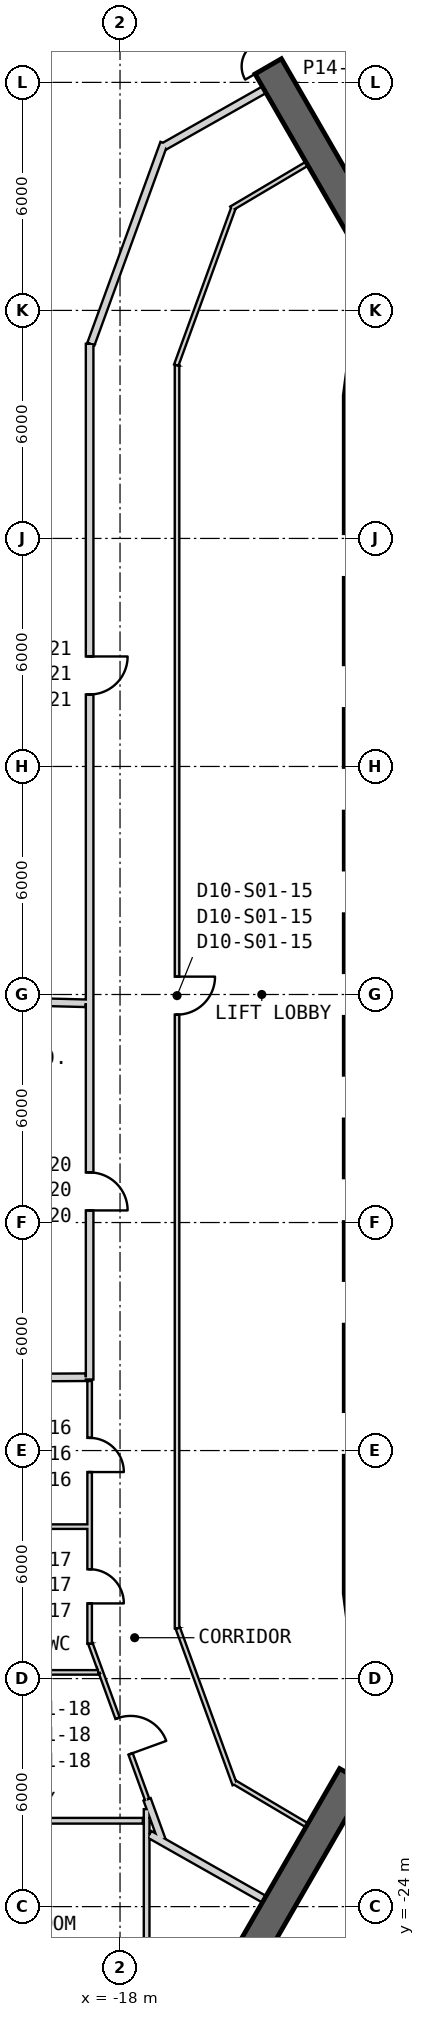
"""IFC4 building model, lengths in metres.
Left out: names, types, materials, properties, quantities, classifications, styles, units other than length and angle.
Written with IfcOpenShell. Run it as: python <this file> out.ifc"""

import sys

from ifc_helpers import new_model, si_unit, direction, frame, frame_2d, origin, place, context, subcontext, project, spatial, polyline, rectangle, outline, extrude, element, fill, save


model = new_model("IFC4")
c1 = context("Model", 3, precision=1e-05, world=origin(), true_north=direction((0.0, 1.0)))
c2 = subcontext(c1, "Body", "Model", "MODEL_VIEW")
j1 = project(units=[si_unit("LENGTHUNIT", "METRE"), si_unit("PLANEANGLEUNIT", "RADIAN")], contexts=[c1])
p1 = place(None, origin())
s1 = spatial("IfcSite", under=j1, at=p1, CompositionType="ELEMENT")
p2 = place(p1, origin())
s2 = spatial("IfcBuilding", under=s1, at=p2, CompositionType="ELEMENT")
p3 = place(p2, frame((0.0, 0.0, 57.8)))
s3 = spatial("IfcBuildingStorey", under=s2, at=p3, CompositionType="ELEMENT", Elevation=57.8)
p4 = place(p3, frame((-11.65, 15.762, 0.0), z_axis=(0.0, 0.0, 1.0), x_axis=(0.0, -1.0, 0.0)))
e1 = element("IfcWall", 1, at=p4, inside=s3, PredefinedType="SHEAR", context=c2, shape_type="SweptSolid", body=[
    extrude(rectangle(XDim=31.523, YDim=0.9, at=frame_2d((15.762, 0.0))), origin(), (0.0, 0.0, 1.0), 4.1),
])
p5 = place(p4, frame((7.062, 0.0, 0.0)))
e2 = element("IfcOpeningElement", 2, at=p5, cuts=e1, PredefinedType="OPENING", context=c2, shape_type="SweptSolid", body=[
    extrude(rectangle(XDim=1.2, YDim=2.4, at=frame_2d((0.6, 1.2))), frame((0.0, 0.46, 0.0), z_axis=(0.0, -1.0, 0.0), x_axis=(1.0, 0.0, 0.0)), (0.0, 0.0, 1.0), 0.92),
])
p6 = place(p4, frame((9.762, 0.0, 0.0)))
e3 = element("IfcOpeningElement", 3, at=p6, cuts=e1, PredefinedType="OPENING", context=c2, shape_type="SweptSolid", body=[
    extrude(rectangle(XDim=1.2, YDim=2.4, at=frame_2d((0.6, 1.2))), frame((0.0, 0.46, 0.0), z_axis=(0.0, -1.0, 0.0), x_axis=(1.0, 0.0, 0.0)), (0.0, 0.0, 1.0), 0.92),
])
p7 = place(p4, frame((12.462, 0.0, 0.0)))
e4 = element("IfcOpeningElement", 4, at=p7, cuts=e1, PredefinedType="OPENING", context=c2, shape_type="SweptSolid", body=[
    extrude(rectangle(XDim=1.2, YDim=2.4, at=frame_2d((0.6, 1.2))), frame((0.0, 0.46, 0.0), z_axis=(0.0, -1.0, 0.0), x_axis=(1.0, 0.0, 0.0)), (0.0, 0.0, 1.0), 0.92),
])
p8 = place(p4, frame((15.162, 0.0, 0.0)))
e5 = element("IfcOpeningElement", 5, at=p8, cuts=e1, PredefinedType="OPENING", context=c2, shape_type="SweptSolid", body=[
    extrude(rectangle(XDim=1.2, YDim=2.4, at=frame_2d((0.6, 1.2))), frame((0.0, 0.46, 0.0), z_axis=(0.0, -1.0, 0.0), x_axis=(1.0, 0.0, 0.0)), (0.0, 0.0, 1.0), 0.92),
])
p9 = place(p4, frame((17.862, 0.0, 0.0)))
e6 = element("IfcOpeningElement", 6, at=p9, cuts=e1, PredefinedType="OPENING", context=c2, shape_type="SweptSolid", body=[
    extrude(rectangle(XDim=1.2, YDim=2.4, at=frame_2d((0.6, 1.2))), frame((0.0, 0.46, 0.0), z_axis=(0.0, -1.0, 0.0), x_axis=(1.0, 0.0, 0.0)), (0.0, 0.0, 1.0), 0.92),
])
p10 = place(p4, frame((20.562, 0.0, 0.0)))
e7 = element("IfcOpeningElement", 7, at=p10, cuts=e1, PredefinedType="OPENING", context=c2, shape_type="SweptSolid", body=[
    extrude(rectangle(XDim=1.2, YDim=2.4, at=frame_2d((0.6, 1.2))), frame((0.0, 0.46, 0.0), z_axis=(0.0, -1.0, 0.0), x_axis=(1.0, 0.0, 0.0)), (0.0, 0.0, 1.0), 0.92),
])
p11 = place(p4, frame((23.262, 0.0, 0.0)))
e8 = element("IfcOpeningElement", 8, at=p11, cuts=e1, PredefinedType="OPENING", context=c2, shape_type="SweptSolid", body=[
    extrude(rectangle(XDim=1.2, YDim=2.4, at=frame_2d((0.6, 1.2))), frame((0.0, 0.46, 0.0), z_axis=(0.0, -1.0, 0.0), x_axis=(1.0, 0.0, 0.0)), (0.0, 0.0, 1.0), 0.92),
])
p12 = place(p4, frame((3.612, 0.0, 0.0)))
e9 = element("IfcOpeningElement", 9, at=p12, cuts=e1, PredefinedType="OPENING", context=c2, shape_type="SweptSolid", body=[
    extrude(rectangle(XDim=1.2, YDim=2.4, at=frame_2d((0.6, 1.2))), frame((0.0, 0.46, 0.0), z_axis=(0.0, -1.0, 0.0), x_axis=(1.0, 0.0, 0.0)), (0.0, 0.0, 1.0), 0.92),
])
p13 = place(p4, frame((26.712, 0.0, 0.0)))
e10 = element("IfcOpeningElement", 10, at=p13, cuts=e1, PredefinedType="OPENING", context=c2, shape_type="SweptSolid", body=[
    extrude(rectangle(XDim=1.2, YDim=2.4, at=frame_2d((0.6, 1.2))), frame((0.0, 0.46, 0.0), z_axis=(0.0, -1.0, 0.0), x_axis=(1.0, 0.0, 0.0)), (0.0, 0.0, 1.0), 0.92),
])
p14 = place(p3, origin())
e11 = element("IfcWall", 11, at=p14, inside=s3, PredefinedType="SHEAR", context=c2, shape_type="SweptSolid", body=[
    extrude(outline(polyline([(-7.6, 18.36), (-8.323, 18.659), (-9.1, 18.762), (-9.876, 18.659), (-10.6, 18.36), (-11.221, 17.883), (-11.698, 17.262), (-11.998, 16.538), (-12.1, 15.762), (-11.2, 15.762), (-11.128, 16.305), (-10.919, 16.812), (-10.585, 17.247), (-10.15, 17.58), (-9.644, 17.79), (-9.1, 17.862), (-8.556, 17.79), (-8.05, 17.58), (-7.6, 18.36)])), origin(), (0.0, 0.0, 1.0), 4.1),
])
p15 = place(p3, origin())
e12 = element("IfcWall", 12, at=p15, inside=s3, PredefinedType="SHEAR", context=c2, shape_type="SweptSolid", body=[
    extrude(outline(polyline([(-12.1, -15.762), (-11.998, -16.538), (-11.698, -17.262), (-11.221, -17.883), (-10.6, -18.36), (-9.876, -18.659), (-9.1, -18.762), (-8.323, -18.659), (-7.6, -18.36), (-8.05, -17.58), (-8.556, -17.79), (-9.1, -17.862), (-9.644, -17.79), (-10.15, -17.58), (-10.585, -17.247), (-10.919, -16.812), (-11.128, -16.305), (-11.2, -15.762), (-12.1, -15.762)])), origin(), (0.0, 0.0, 1.0), 4.1),
])
p16 = place(p3, frame((-10.575, 18.316, 0.0), z_axis=(0.0, 0.0, 1.0), x_axis=(-0.500001010139, 0.866024820579, 0.0)))
e13 = element("IfcWall", 13, at=p16, inside=s3, PredefinedType="SHEAR", context=c2, shape_type="SweptSolid", body=[
    extrude(rectangle(XDim=13.884, YDim=0.8, at=frame_2d((6.942, 0.0))), origin(), (0.0, 0.0, 1.0), 4.1),
])
p17 = place(p16, frame((7.05, 0.0, 0.0)))
e14 = element("IfcOpeningElement", 14, at=p17, cuts=e13, PredefinedType="OPENING", context=c2, shape_type="SweptSolid", body=[
    extrude(rectangle(XDim=1.4, YDim=2.4, at=frame_2d((0.7, 1.2))), frame((0.0, 0.41, 0.0), z_axis=(0.0, -1.0, 0.0), x_axis=(1.0, 0.0, 0.0)), (0.0, 0.0, 1.0), 0.82),
])
p18 = place(p3, frame((-10.575, -18.316, 0.0), z_axis=(0.0, 0.0, 1.0), x_axis=(-0.500001010139, -0.866024820579, 0.0)))
e15 = element("IfcWall", 15, at=p18, inside=s3, PredefinedType="SHEAR", context=c2, shape_type="SweptSolid", body=[
    extrude(rectangle(XDim=13.884, YDim=0.8, at=frame_2d((6.942, 0.0))), origin(), (0.0, 0.0, 1.0), 4.1),
])
p19 = place(p18, frame((1.2, 0.0, 0.0)))
e16 = element("IfcOpeningElement", 16, at=p19, cuts=e15, PredefinedType="OPENING", context=c2, shape_type="SweptSolid", body=[
    extrude(rectangle(XDim=1.4, YDim=2.4, at=frame_2d((0.7, 1.2))), frame((0.0, 0.41, 0.0), z_axis=(0.0, -1.0, 0.0), x_axis=(1.0, 0.0, 0.0)), (0.0, 0.0, 1.0), 0.82),
])
p20 = place(p3, frame((-13.082, 21.859, 0.0), z_axis=(0.0, 0.0, 1.0), x_axis=(-0.860286384661, -0.509811079095, 0.0)))
e17 = element("IfcWall", 17, at=p20, inside=s3, PredefinedType="PARTITIONING", context=c2, shape_type="SweptSolid", body=[
    extrude(rectangle(XDim=2.311, YDim=0.12, at=frame_2d((1.155, 0.0))), origin(), (0.0, 0.0, 1.0), 3.8),
])
p21 = place(p3, frame((-15.017, 20.692, 0.0), z_axis=(0.0, 0.0, 1.0), x_axis=(-0.342028368186, -0.939689627141, 0.0)))
e18 = element("IfcWall", 18, at=p21, inside=s3, PredefinedType="PARTITIONING", context=c2, shape_type="SweptSolid", body=[
    extrude(rectangle(XDim=4.397, YDim=0.12, at=frame_2d((2.198, 0.0))), origin(), (0.0, 0.0, 1.0), 2.88),
])
p22 = place(p3, frame((-16.5, 16.557, 0.0), z_axis=(0.0, 0.0, 1.0), x_axis=(0.0, -1.0, 0.0)))
e19 = element("IfcWall", 19, at=p22, inside=s3, PredefinedType="PARTITIONING", context=c2, shape_type="SweptSolid", body=[
    extrude(rectangle(XDim=33.234, YDim=0.12, at=frame_2d((16.617, 0.0))), origin(), (0.0, 0.0, 1.0), 2.98),
])
p23 = place(p22, frame((16.087, 0.0, 0.0)))
e20 = element("IfcOpeningElement", 20, at=p23, cuts=e19, PredefinedType="OPENING", context=c2, shape_type="SweptSolid", body=[
    extrude(rectangle(XDim=1.0, YDim=2.1, at=frame_2d((0.5, 1.05))), frame((0.0, 0.07, 0.0), z_axis=(0.0, -1.0, 0.0), x_axis=(1.0, 0.0, 0.0)), (0.0, 0.0, 1.0), 0.14),
])
p24 = place(p3, frame((-16.479, -16.673, 0.0), z_axis=(0.0, 0.0, 1.0), x_axis=(0.342025144217, -0.939690800595, 0.0)))
e21 = element("IfcWall", 21, at=p24, inside=s3, PredefinedType="PARTITIONING", context=c2, shape_type="SweptSolid", body=[
    extrude(rectangle(XDim=4.378, YDim=0.12, at=frame_2d((2.189, 0.0))), origin(), (0.0, 0.0, 1.0), 2.88),
])
p25 = place(p3, frame((-14.983, -20.732, 0.0), z_axis=(0.0, 0.0, 1.0), x_axis=(0.860268204019, -0.509841756973, 0.0)))
e22 = element("IfcWall", 22, at=p25, inside=s3, PredefinedType="PARTITIONING", context=c2, shape_type="SweptSolid", body=[
    extrude(rectangle(XDim=2.21, YDim=0.12, at=frame_2d((1.105, 0.0))), origin(), (0.0, 0.0, 1.0), 3.8),
])
p26 = place(p3, frame((-18.8, 17.122, 0.0), z_axis=(0.0, 0.0, 1.0), x_axis=(0.0, -1.0, 0.0)))
e23 = element("IfcWall", 23, at=p26, inside=s3, PredefinedType="PARTITIONING", context=c2, shape_type="SweptSolid", body=[
    extrude(rectangle(XDim=27.252, YDim=0.2, at=frame_2d((13.626, 0.0))), origin(), (0.0, 0.0, 1.0), 3.08),
])
p27 = place(p26, frame((21.804, 0.0, 0.0)))
e24 = element("IfcOpeningElement", 24, at=p27, cuts=e23, PredefinedType="OPENING", context=c2, shape_type="SweptSolid", body=[
    extrude(rectangle(XDim=1.0, YDim=2.1, at=frame_2d((0.5, 1.05))), frame((0.0, 0.11, 0.0), z_axis=(0.0, -1.0, 0.0), x_axis=(1.0, 0.0, 0.0)), (0.0, 0.0, 1.0), 0.22),
])
p28 = place(p26, frame((8.228, 0.0, 0.0)))
e25 = element("IfcOpeningElement", 25, at=p28, cuts=e23, PredefinedType="OPENING", context=c2, shape_type="SweptSolid", body=[
    extrude(rectangle(XDim=1.0, YDim=2.1, at=frame_2d((0.5, 1.05))), frame((0.0, 0.11, 0.0), z_axis=(0.0, -1.0, 0.0), x_axis=(1.0, 0.0, 0.0)), (0.0, 0.0, 1.0), 0.22),
])
p29 = place(p3, frame((-17.225, -22.098, 0.0), z_axis=(0.0, 0.0, 1.0), x_axis=(0.870318902943, -0.492488585838, 0.0)))
e26 = element("IfcWall", 26, at=p29, inside=s3, PredefinedType="PARTITIONING", context=c2, shape_type="SweptSolid", body=[
    extrude(rectangle(XDim=3.469, YDim=0.2, at=frame_2d((1.734, 0.0))), origin(), (0.0, 0.0, 1.0), 2.88),
])
p30 = place(p3, frame((-17.288, -21.178, 0.0), z_axis=(0.0, 0.0, 1.0), x_axis=(0.342070628624, -0.939674244104, 0.0)))
e27 = element("IfcWall", 27, at=p30, inside=s3, PredefinedType="PARTITIONING", context=c2, shape_type="SweptSolid", body=[
    extrude(rectangle(XDim=1.137, YDim=0.2, at=frame_2d((0.568, 0.0))), origin(), (0.0, 0.0, 1.0), 2.88),
])
p31 = place(p3, frame((-16.842, 22.402, 0.0), z_axis=(0.0, 0.0, 1.0), x_axis=(-0.342049747763, -0.939681845124, 0.0)))
e28 = element("IfcWall", 28, at=p31, inside=s3, PredefinedType="PARTITIONING", context=c2, shape_type="SweptSolid", body=[
    extrude(rectangle(XDim=5.625, YDim=0.2, at=frame_2d((2.812, 0.0))), origin(), (0.0, 0.0, 1.0), 2.88),
])
p32 = place(p3, frame((-14.206, 23.806, 0.0), z_axis=(0.0, 0.0, 1.0), x_axis=(-0.87028621909, -0.492546339811, 0.0)))
e29 = element("IfcWall", 29, at=p32, inside=s3, PredefinedType="PARTITIONING", context=c2, shape_type="SweptSolid", body=[
    extrude(rectangle(XDim=3.026, YDim=0.2, at=frame_2d((1.513, 0.0))), origin(), (0.0, 0.0, 1.0), 3.8),
])
p33 = place(p3, frame((-18.8, -10.17, 0.0), z_axis=(0.0, 0.0, 1.0), x_axis=(0.0, -1.0, 0.0)))
e30 = element("IfcWall", 30, at=p33, inside=s3, PredefinedType="PARTITIONING", context=c2, shape_type="SweptSolid", body=[
    extrude(rectangle(XDim=6.913, YDim=0.12, at=frame_2d((3.456, 0.0))), origin(), (0.0, 0.0, 1.0), 3.08),
])
p34 = place(p33, frame((1.496, 0.0, 0.0)))
e31 = element("IfcOpeningElement", 31, at=p34, cuts=e30, PredefinedType="OPENING", context=c2, shape_type="SweptSolid", body=[
    extrude(rectangle(XDim=0.9, YDim=2.1, at=frame_2d((0.45, 1.05))), frame((0.0, 0.07, 0.0), z_axis=(0.0, -1.0, 0.0), x_axis=(1.0, 0.0, 0.0)), (0.0, 0.0, 1.0), 0.14),
])
p35 = place(p33, frame((4.952, 0.0, 0.0)))
e32 = element("IfcOpeningElement", 32, at=p35, cuts=e30, PredefinedType="OPENING", context=c2, shape_type="SweptSolid", body=[
    extrude(rectangle(XDim=0.9, YDim=2.1, at=frame_2d((0.45, 1.05))), frame((0.0, 0.07, 0.0), z_axis=(0.0, -1.0, 0.0), x_axis=(1.0, 0.0, 0.0)), (0.0, 0.0, 1.0), 0.14),
])
p36 = place(p3, frame((-18.78, -17.079, 0.0), z_axis=(0.0, 0.0, 1.0), x_axis=(0.342127231308, -0.939653637037, 0.0)))
e33 = element("IfcWall", 33, at=p36, inside=s3, PredefinedType="PARTITIONING", context=c2, shape_type="SweptSolid", body=[
    extrude(rectangle(XDim=0.816, YDim=0.12, at=frame_2d((0.408, 0.0))), origin(), (0.0, 0.0, 1.0), 2.98),
])
p37 = place(p3, frame((-18.5, -17.846, 0.0), z_axis=(0.0, 0.0, 1.0), x_axis=(0.342013954414, -0.939694873342, 0.0)))
e34 = element("IfcWall", 34, at=p37, inside=s3, PredefinedType="PARTITIONING", context=c2, shape_type="SweptSolid", body=[
    extrude(rectangle(XDim=3.546, YDim=0.12, at=frame_2d((1.773, 0.0))), origin(), (0.0, 0.0, 1.0), 3.8),
])
p38 = place(p37, frame((1.273, 0.0, 0.0)))
e35 = element("IfcOpeningElement", 35, at=p38, cuts=e34, PredefinedType="OPENING", context=c2, shape_type="SweptSolid", body=[
    extrude(rectangle(XDim=1.0, YDim=2.1, at=frame_2d((0.5, 1.05))), frame((0.0, 0.07, 0.0), z_axis=(0.0, -1.0, 0.0), x_axis=(1.0, 0.0, 0.0)), (0.0, 0.0, 1.0), 0.14),
])
p39 = place(p3, frame((-26.685, -0.029, 0.0), z_axis=(0.0, 0.0, 1.0), x_axis=(0.999664660835, -0.025895286789, 0.0)))
e36 = element("IfcWall", 36, at=p39, inside=s3, PredefinedType="PARTITIONING", context=c2, shape_type="SweptSolid", body=[
    extrude(rectangle(XDim=7.788, YDim=0.2, at=frame_2d((3.894, 0.0))), origin(), (0.0, 0.0, 1.0), 3.08),
])
p40 = place(p3, frame((-18.9, -10.071, 0.0), z_axis=(0.0, 0.0, 1.0), x_axis=(-0.999983827501, -0.005687243297, 0.0)))
e37 = element("IfcWall", 37, at=p40, inside=s3, PredefinedType="PARTITIONING", context=c2, shape_type="SweptSolid", body=[
    extrude(rectangle(XDim=5.28, YDim=0.2, at=frame_2d((2.64, 0.0))), origin(), (0.0, 0.0, 1.0), 3.8),
])
p41 = place(p3, frame((-17.3, -27.155, 0.0), z_axis=(0.0, 0.0, 1.0), x_axis=(0.0, 1.0, 0.0)))
e38 = element("IfcWall", 38, at=p41, inside=s3, PredefinedType="PLUMBINGWALL", context=c2, shape_type="SweptSolid", body=[
    extrude(rectangle(XDim=5.719, YDim=0.15, at=frame_2d((2.859, 0.0))), origin(), (0.0, 0.0, 1.0), 2.88),
])
p42 = place(p3, frame((-23.98, -14.002, 0.0), z_axis=(0.0, 0.0, 1.0), x_axis=(1.0, 0.0, 0.0)))
e39 = element("IfcWall", 39, at=p42, inside=s3, PredefinedType="PARTITIONING", context=c2, shape_type="SweptSolid", body=[
    extrude(rectangle(XDim=5.12, YDim=0.12, at=frame_2d((2.56, 0.0))), origin(), (0.0, 0.0, 1.0), 3.08),
])
p43 = place(p3, frame((-18.567, -17.837, 0.0), z_axis=(0.0, 0.0, 1.0), x_axis=(-1.0, 0.0, 0.0)))
e40 = element("IfcWall", 40, at=p43, inside=s3, PredefinedType="PARTITIONING", context=c2, shape_type="SweptSolid", body=[
    extrude(rectangle(XDim=5.413, YDim=0.12, at=frame_2d((2.706, 0.0))), origin(), (0.0, 0.0, 1.0), 2.98),
])
p44 = place(p3, frame((-17.4, -21.741, 0.0), z_axis=(0.0, 0.0, 1.0), x_axis=(-1.0, 0.0, 0.0)))
e41 = element("IfcWall", 41, at=p44, inside=s3, PredefinedType="PLUMBINGWALL", context=c2, shape_type="SweptSolid", body=[
    extrude(rectangle(XDim=6.58, YDim=0.15, at=frame_2d((3.29, 0.0))), origin(), (0.0, 0.0, 1.0), 2.98),
])
p45 = place(p23, origin())
e42 = element("IfcDoor", 42, at=p45, inside=s3, OperationType="SINGLE_SWING_LEFT", PredefinedType="NOTDEFINED", context=c2, shape_type="SweptSolid", body=[
    extrude(rectangle(XDim=1.0, YDim=2.1, at=frame_2d((0.5, 1.05))), frame((0.0, 0.025, 0.0), z_axis=(0.0, -1.0, 0.0), x_axis=(1.0, 0.0, 0.0)), (0.0, 0.0, 1.0), 0.05),
])
fill(e20, e42)
p46 = place(p34, origin())
e43 = element("IfcDoor", 43, at=p46, inside=s3, OperationType="SINGLE_SWING_LEFT", PredefinedType="NOTDEFINED", context=c2, shape_type="SweptSolid", body=[
    extrude(rectangle(XDim=0.9, YDim=2.1, at=frame_2d((0.45, 1.05))), frame((0.0, 0.025, 0.0), z_axis=(0.0, -1.0, 0.0), x_axis=(1.0, 0.0, 0.0)), (0.0, 0.0, 1.0), 0.05),
])
fill(e31, e43)
p47 = place(p35, origin())
e44 = element("IfcDoor", 44, at=p47, inside=s3, OperationType="SINGLE_SWING_LEFT", PredefinedType="NOTDEFINED", context=c2, shape_type="SweptSolid", body=[
    extrude(rectangle(XDim=0.9, YDim=2.1, at=frame_2d((0.45, 1.05))), frame((0.0, 0.025, 0.0), z_axis=(0.0, -1.0, 0.0), x_axis=(1.0, 0.0, 0.0)), (0.0, 0.0, 1.0), 0.05),
])
fill(e32, e44)
p48 = place(p38, origin())
e45 = element("IfcDoor", 45, at=p48, inside=s3, OperationType="SINGLE_SWING_LEFT", PredefinedType="NOTDEFINED", context=c2, shape_type="SweptSolid", body=[
    extrude(rectangle(XDim=1.0, YDim=2.1, at=frame_2d((0.5, 1.05))), frame((0.0, 0.025, 0.0), z_axis=(0.0, -1.0, 0.0), x_axis=(1.0, 0.0, 0.0)), (0.0, 0.0, 1.0), 0.05),
])
fill(e35, e45)
p49 = place(p27, origin())
e46 = element("IfcDoor", 46, at=p49, inside=s3, OperationType="SINGLE_SWING_LEFT", PredefinedType="USERDEFINED", context=c2, shape_type="SweptSolid", body=[
    extrude(rectangle(XDim=1.0, YDim=2.1, at=frame_2d((0.5, 1.05))), frame((0.0, 0.025, 0.0), z_axis=(0.0, -1.0, 0.0), x_axis=(1.0, 0.0, 0.0)), (0.0, 0.0, 1.0), 0.05),
])
fill(e24, e46)
p50 = place(p28, origin())
e47 = element("IfcDoor", 47, at=p50, inside=s3, OperationType="SINGLE_SWING_RIGHT", PredefinedType="USERDEFINED", context=c2, shape_type="SweptSolid", body=[
    extrude(rectangle(XDim=1.0, YDim=2.1, at=frame_2d((0.5, 1.05))), frame((0.0, 0.025, 0.0), z_axis=(0.0, -1.0, 0.0), x_axis=(1.0, 0.0, 0.0)), (0.0, 0.0, 1.0), 0.05),
])
fill(e25, e47)
p51 = place(p17, origin())
e48 = element("IfcDoor", 48, at=p51, inside=s3, OperationType="DOUBLE_DOOR_SINGLE_SWING", PredefinedType="NOTDEFINED", context=c2, shape_type="SweptSolid", body=[
    extrude(rectangle(XDim=1.4, YDim=2.4, at=frame_2d((0.7, 1.2))), frame((0.0, 0.025, 0.0), z_axis=(0.0, -1.0, 0.0), x_axis=(1.0, 0.0, 0.0)), (0.0, 0.0, 1.0), 0.05),
])
fill(e14, e48)
save(model, sys.argv[1])
